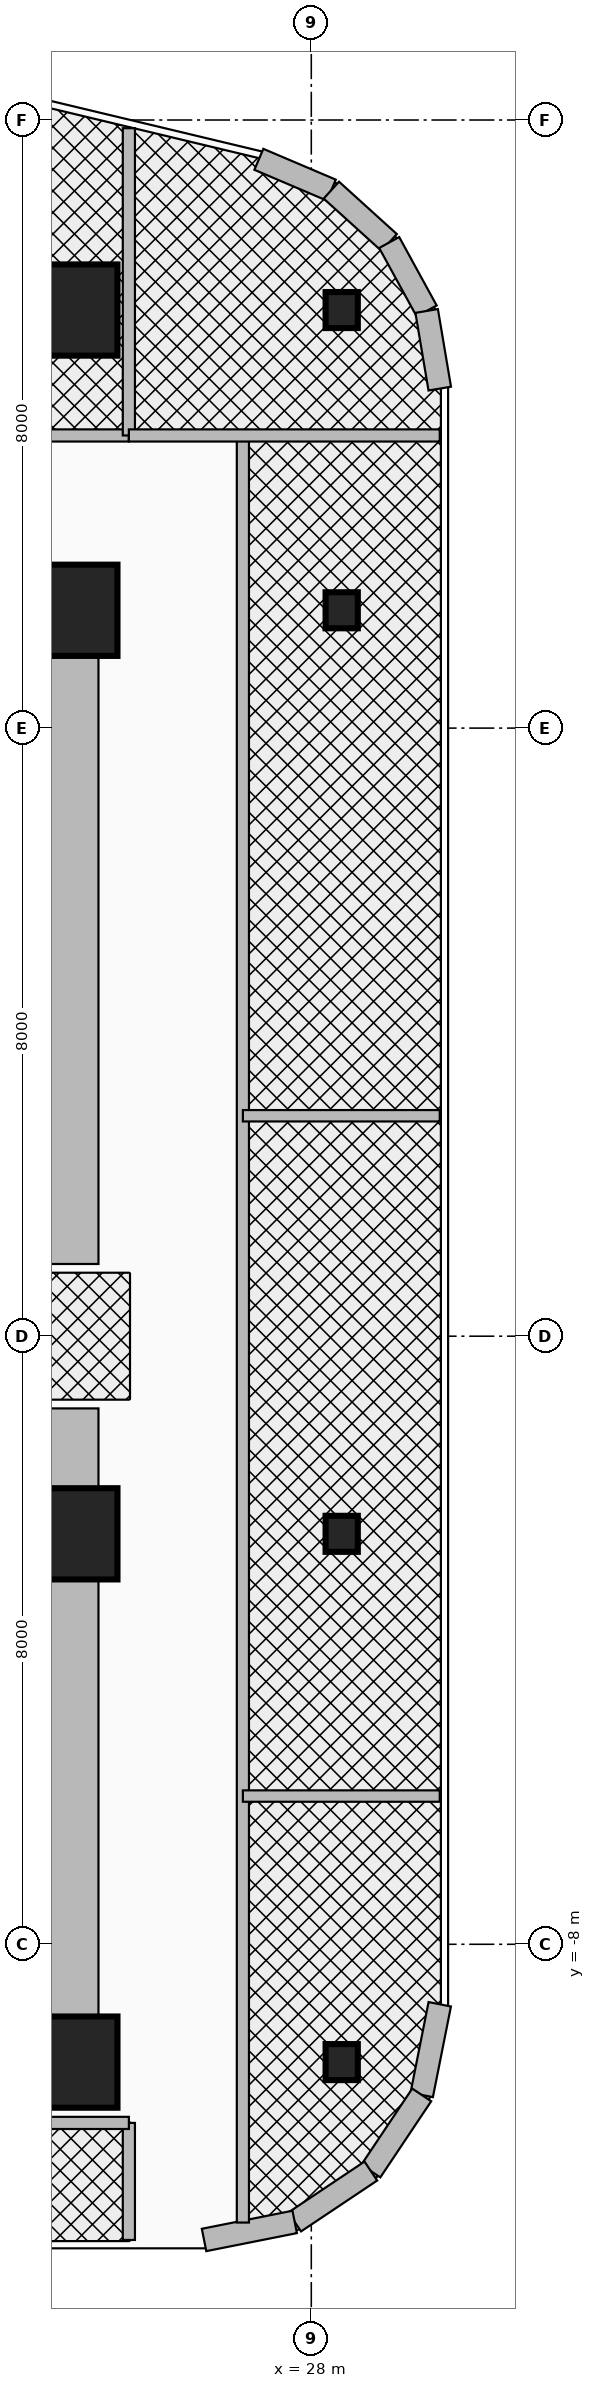
"""IFC4 building model, lengths in metres.
Left out: names, types, materials, properties, quantities, classifications, styles, units other than length and angle.
Written with IfcOpenShell. Run it as: python <this file> out.ifc"""

import sys

from ifc_helpers import new_model, si_unit, direction, frame, frame_2d, origin, origin_2d, place, context, subcontext, project, spatial, rectangle, i_section, extrude, source, transform, mapped, element, fill, save


model = new_model("IFC4")
c1 = context("Model", 3, precision=1e-05, world=origin(), true_north=direction((0.0, 1.0)))
c2 = subcontext(c1, "Body", "Model", "MODEL_VIEW")
j1 = project(units=[si_unit("LENGTHUNIT", "METRE"), si_unit("PLANEANGLEUNIT", "RADIAN")], contexts=[c1])
p1 = place(None, origin())
s1 = spatial("IfcSite", under=j1, at=p1, CompositionType="ELEMENT")
p2 = place(p1, origin())
s2 = spatial("IfcBuilding", under=s1, at=p2, CompositionType="ELEMENT")
p3 = place(p2, frame((0.0, 0.0, 109.4)))
s3 = spatial("IfcBuildingStorey", under=s2, at=p3, CompositionType="ELEMENT", Elevation=109.4)
for number, where, z_axis, x_axis in (
    (1, (24.85, -9.9, 0.0), (0.0, 0.0, 1.0), (0.0, 1.0, 0.0)),
    (2, (24.85, 0.95, 0.0), (0.0, 0.0, 1.0), (0.0, 1.0, 0.0)),
):
    element("IfcWall", number, at=place(p3, frame(where, z_axis=z_axis, x_axis=x_axis)), inside=s3, PredefinedType="SHEAR", context=c2, shape_type="SweptSolid", body=[
        extrude(rectangle(XDim=8.95, YDim=0.7, at=frame_2d((4.475, 0.0))), origin(), (0.0, 0.0, 1.0), 3.46),
    ])
for number, where, z_axis, x_axis in (
    (3, (15.85, 9.55, 0.0), (0.0, 0.0, 1.0), (1.0, 0.0, 0.0)),
    (4, (15.85, -9.55, 0.0), (0.0, 0.0, 1.0), (1.0, 0.0, 0.0)),
):
    element("IfcWall", number, at=place(p3, frame(where, z_axis=z_axis, x_axis=x_axis)), inside=s3, PredefinedType="SHEAR", context=c2, shape_type="SweptSolid", body=[
        extrude(rectangle(XDim=9.0, YDim=0.7, at=frame_2d((4.5, 0.0))), origin(), (0.0, 0.0, 1.0), 3.46),
    ])
m1 = source(origin(), c2, "Body", "SweptSolid", [
    extrude(rectangle(XDim=1.2, YDim=1.2, at=origin_2d()), origin(), (0.0, 0.0, 1.0), 3.7),
])
p4 = place(p3, frame((24.85, -9.55, 0.0), z_axis=(0.0, 0.0, 1.0), x_axis=(1.0, 0.0, 0.0)))
e5 = element("IfcColumn", 5, at=p4, inside=s3, PredefinedType="COLUMN", context=c2, shape_type="MappedRepresentation", body=[
    mapped(m1, transform((0.0, 0.0, 0.0), x_axis=(1.0, 0.0, 0.0), y_axis=(0.0, 1.0, 0.0), z_axis=(0.0, 0.0, 1.0), scale=1.0)),
])
m2 = source(origin(), c2, "Body", "SweptSolid", [
    extrude(i_section(OverallWidth=0.424, OverallDepth=0.474, WebThickness=0.048, FlangeThickness=0.077, at=origin_2d()), origin(), (0.0, 0.0, 1.0), 3.7),
])
p5 = place(p3, frame((28.4, -9.55, 0.0), z_axis=(0.0, 0.0, 1.0), x_axis=(1.0, 0.0, 0.0)))
e6 = element("IfcColumn", 6, at=p5, inside=s3, PredefinedType="COLUMN", context=c2, shape_type="MappedRepresentation", body=[
    mapped(m2, transform((0.0, 0.0, 0.0), x_axis=(1.0, 0.0, 0.0), y_axis=(0.0, 1.0, 0.0), z_axis=(0.0, 0.0, 1.0), scale=1.0)),
])
p6 = place(p3, frame((24.85, -2.6, 0.0), z_axis=(0.0, 0.0, 1.0), x_axis=(1.0, 0.0, 0.0)))
e7 = element("IfcColumn", 7, at=p6, inside=s3, PredefinedType="COLUMN", context=c2, shape_type="MappedRepresentation", body=[
    mapped(m1, transform((0.0, 0.0, 0.0), x_axis=(1.0, 0.0, 0.0), y_axis=(0.0, 1.0, 0.0), z_axis=(0.0, 0.0, 1.0), scale=1.0)),
])
p7 = place(p3, frame((28.4, -2.6, 0.0), z_axis=(0.0, 0.0, 1.0), x_axis=(1.0, 0.0, 0.0)))
e8 = element("IfcColumn", 8, at=p7, inside=s3, PredefinedType="COLUMN", context=c2, shape_type="MappedRepresentation", body=[
    mapped(m2, transform((0.0, 0.0, 0.0), x_axis=(1.0, 0.0, 0.0), y_axis=(0.0, 1.0, 0.0), z_axis=(0.0, 0.0, 1.0), scale=1.0)),
])
p8 = place(p3, frame((24.85, 9.55, 0.0), z_axis=(0.0, 0.0, 1.0), x_axis=(1.0, 0.0, 0.0)))
e9 = element("IfcColumn", 9, at=p8, inside=s3, PredefinedType="COLUMN", context=c2, shape_type="MappedRepresentation", body=[
    mapped(m1, transform((0.0, 0.0, 0.0), x_axis=(1.0, 0.0, 0.0), y_axis=(0.0, 1.0, 0.0), z_axis=(0.0, 0.0, 1.0), scale=1.0)),
])
p9 = place(p3, frame((28.4, 9.55, 0.0), z_axis=(0.0, 0.0, 1.0), x_axis=(1.0, 0.0, 0.0)))
e10 = element("IfcColumn", 10, at=p9, inside=s3, PredefinedType="COLUMN", context=c2, shape_type="MappedRepresentation", body=[
    mapped(m2, transform((0.0, 0.0, 0.0), x_axis=(1.0, 0.0, 0.0), y_axis=(0.0, 1.0, 0.0), z_axis=(0.0, 0.0, 1.0), scale=1.0)),
])
p10 = place(p3, frame((24.85, 13.5, 0.0), z_axis=(0.0, 0.0, 1.0), x_axis=(1.0, 0.0, 0.0)))
e11 = element("IfcColumn", 11, at=p10, inside=s3, PredefinedType="COLUMN", context=c2, shape_type="MappedRepresentation", body=[
    mapped(m1, transform((0.0, 0.0, 0.0), x_axis=(1.0, 0.0, 0.0), y_axis=(0.0, 1.0, 0.0), z_axis=(0.0, 0.0, 1.0), scale=1.0)),
])
p11 = place(p3, frame((28.4, 13.5, 0.0), z_axis=(0.0, 0.0, 1.0), x_axis=(1.0, 0.0, 0.0)))
e12 = element("IfcColumn", 12, at=p11, inside=s3, PredefinedType="COLUMN", context=c2, shape_type="MappedRepresentation", body=[
    mapped(m2, transform((0.0, 0.0, 0.0), x_axis=(1.0, 0.0, 0.0), y_axis=(0.0, 1.0, 0.0), z_axis=(0.0, 0.0, 1.0), scale=1.0)),
])
p12 = place(p3, frame((27.31, 15.483, 0.0), z_axis=(0.0, 0.0, 1.0), x_axis=(0.920250328759, -0.391330208927, 0.0)))
e13 = element("IfcWall", 13, at=p12, inside=s3, PredefinedType="SOLIDWALL", context=c2, shape_type="SweptSolid", body=[
    extrude(rectangle(XDim=1.036, YDim=0.3, at=frame_2d((0.518, 0.0))), origin(), (0.0, 0.0, 1.0), 3.46),
])
p13 = place(p3, frame((28.264, 15.077, 0.0), z_axis=(0.0, 0.0, 1.0), x_axis=(0.741208839713, -0.671274501178, 0.0)))
e14 = element("IfcWall", 14, at=p13, inside=s3, PredefinedType="SOLIDWALL", context=c2, shape_type="SweptSolid", body=[
    extrude(rectangle(XDim=1.026, YDim=0.3, at=frame_2d((0.513, 0.0))), origin(), (0.0, 0.0, 1.0), 3.46),
])
p14 = place(p3, frame((29.025, 14.388, 0.0), z_axis=(0.0, 0.0, 1.0), x_axis=(0.480284137298, -0.87711296163, 0.0)))
e15 = element("IfcWall", 15, at=p14, inside=s3, PredefinedType="SOLIDWALL", context=c2, shape_type="SweptSolid", body=[
    extrude(rectangle(XDim=1.027, YDim=0.3, at=frame_2d((0.513, 0.0))), origin(), (0.0, 0.0, 1.0), 3.46),
])
p15 = place(p3, frame((29.518, 13.488, 0.0), z_axis=(0.0, 0.0, 1.0), x_axis=(0.166156796952, -0.986099345313, 0.0)))
e16 = element("IfcWall", 16, at=p15, inside=s3, PredefinedType="SOLIDWALL", context=c2, shape_type="SweptSolid", body=[
    extrude(rectangle(XDim=1.036, YDim=0.3, at=frame_2d((0.518, 0.0))), origin(), (0.0, 0.0, 1.0), 3.46),
])
p16 = place(p3, frame((29.69, -8.789, 0.0), z_axis=(0.0, 0.0, 1.0), x_axis=(-0.194996050505, -0.980804027463, 0.0)))
e17 = element("IfcWall", 17, at=p16, inside=s3, PredefinedType="SOLIDWALL", context=c2, shape_type="SweptSolid", body=[
    extrude(rectangle(XDim=1.216, YDim=0.3, at=frame_2d((0.608, 0.0))), origin(), (0.0, 0.0, 1.0), 3.46),
])
for number, where, z_axis, x_axis in (
    (18, (29.453, -9.982, 0.0), (0.0, 0.0, 1.0), (-0.556, -0.831, 0.0)),
    (19, (28.783, -10.983, 0.0), (0.0, 0.0, 1.0), (-0.831, -0.556, 0.0)),
):
    element("IfcWall", number, at=place(p3, frame(where, z_axis=z_axis, x_axis=x_axis)), inside=s3, PredefinedType="SOLIDWALL", context=c2, shape_type="SweptSolid", body=[
        extrude(rectangle(XDim=1.205, YDim=0.3, at=frame_2d((0.603, 0.0))), origin(), (0.0, 0.0, 1.0), 3.46),
    ])
p17 = place(p3, frame((27.782, -11.653, 0.0), z_axis=(0.0, 0.0, 1.0), x_axis=(-0.980811661072, -0.194957650543, 0.0)))
e20 = element("IfcWall", 20, at=p17, inside=s3, PredefinedType="SOLIDWALL", context=c2, shape_type="SweptSolid", body=[
    extrude(rectangle(XDim=1.216, YDim=0.3, at=frame_2d((0.608, 0.0))), origin(), (0.0, 0.0, 1.0), 3.46),
])
p18 = place(p3, frame((15.4, 11.85, 0.0), z_axis=(0.0, 0.0, 1.0), x_axis=(1.0, 0.0, 0.0)))
e21 = element("IfcWall", 21, at=p18, inside=s3, PredefinedType="PARTITIONING", context=c2, shape_type="SweptSolid", body=[
    extrude(rectangle(XDim=10.2, YDim=0.16, at=frame_2d((5.1, 0.0))), origin(), (0.0, 0.0, 1.0), 2.834),
])
p19 = place(p18, frame((4.65, 0.0, 0.0)))
e22 = element("IfcOpeningElement", 22, at=p19, cuts=e21, PredefinedType="OPENING", context=c2, shape_type="SweptSolid", body=[
    extrude(rectangle(XDim=0.9, YDim=2.1, at=frame_2d((0.45, 1.05))), frame((0.0, 0.095, 0.0), z_axis=(0.0, -1.0, 0.0), x_axis=(1.0, 0.0, 0.0)), (0.0, 0.0, 1.0), 0.19),
])
p20 = place(p3, frame((25.6, 11.85, 0.0), z_axis=(0.0, 0.0, 1.0), x_axis=(0.0, 1.0, 0.0)))
e23 = element("IfcWall", 23, at=p20, inside=s3, PredefinedType="PARTITIONING", context=c2, shape_type="SweptSolid", body=[
    extrude(rectangle(XDim=4.042, YDim=0.16, at=frame_2d((2.021, 0.0))), origin(), (0.0, 0.0, 1.0), 2.666),
])
p21 = place(p3, frame((25.6, -11.89, 0.0), z_axis=(0.0, 0.0, 1.0), x_axis=(0.0, 1.0, 0.0)))
e24 = element("IfcWall", 24, at=p21, inside=s3, PredefinedType="PARTITIONING", context=c2, shape_type="SweptSolid", body=[
    extrude(rectangle(XDim=1.54, YDim=0.16, at=frame_2d((0.77, 0.0))), origin(), (0.0, 0.0, 1.0), 3.46),
])
p22 = place(p21, frame((0.32, 0.0, 0.0)))
e25 = element("IfcOpeningElement", 25, at=p22, cuts=e24, PredefinedType="OPENING", context=c2, shape_type="SweptSolid", body=[
    extrude(rectangle(XDim=0.9, YDim=2.1, at=frame_2d((0.45, 1.05))), frame((0.0, 0.095, 0.0), z_axis=(0.0, -1.0, 0.0), x_axis=(1.0, 0.0, 0.0)), (0.0, 0.0, 1.0), 0.19),
])
p23 = place(p3, frame((14.044, -10.35, 0.0), z_axis=(0.0, 0.0, 1.0), x_axis=(1.0, 0.0, 0.0)))
e26 = element("IfcWall", 26, at=p23, inside=s3, PredefinedType="PARTITIONING", context=c2, shape_type="SweptSolid", body=[
    extrude(rectangle(XDim=11.556, YDim=0.16, at=frame_2d((5.778, 0.0))), origin(), (0.0, 0.0, 1.0), 3.46),
])
p24 = place(p3, frame((27.1, -11.661, 0.0), z_axis=(0.0, 0.0, 1.0), x_axis=(0.0, 1.0, 0.0)))
e27 = element("IfcWall", 27, at=p24, inside=s3, PredefinedType="PARTITIONING", context=c2, shape_type="SweptSolid", body=[
    extrude(rectangle(XDim=23.511, YDim=0.16, at=frame_2d((11.755, 0.0))), origin(), (0.0, 0.0, 1.0), 2.666),
])
p25 = place(p24, frame((2.56, 0.0, 0.0)))
e28 = element("IfcOpeningElement", 28, at=p25, cuts=e27, PredefinedType="OPENING", context=c2, shape_type="SweptSolid", body=[
    extrude(rectangle(XDim=0.9, YDim=2.1, at=frame_2d((0.45, 1.05))), frame((0.0, 0.095, 0.0), z_axis=(0.0, -1.0, 0.0), x_axis=(1.0, 0.0, 0.0)), (0.0, 0.0, 1.0), 0.19),
])
p26 = place(p24, frame((9.451, 0.0, 0.0)))
e29 = element("IfcOpeningElement", 29, at=p26, cuts=e27, PredefinedType="OPENING", context=c2, shape_type="SweptSolid", body=[
    extrude(rectangle(XDim=1.8, YDim=2.15, at=frame_2d((0.9, 1.075))), frame((0.0, 0.095, 0.0), z_axis=(0.0, -1.0, 0.0), x_axis=(1.0, 0.0, 0.0)), (0.0, 0.0, 1.0), 0.19),
])
p27 = place(p24, frame((18.136, 0.0, 0.0)))
e30 = element("IfcOpeningElement", 30, at=p27, cuts=e27, PredefinedType="OPENING", context=c2, shape_type="SweptSolid", body=[
    extrude(rectangle(XDim=1.8, YDim=2.15, at=frame_2d((0.9, 1.075))), frame((0.0, 0.095, 0.0), z_axis=(0.0, -1.0, 0.0), x_axis=(1.0, 0.0, 0.0)), (0.0, 0.0, 1.0), 0.19),
])
p28 = place(p3, frame((25.6, 11.85, 0.0), z_axis=(0.0, 0.0, 1.0), x_axis=(1.0, 0.0, 0.0)))
e31 = element("IfcWall", 31, at=p28, inside=s3, PredefinedType="PARTITIONING", context=c2, shape_type="SweptSolid", body=[
    extrude(rectangle(XDim=4.09, YDim=0.16, at=frame_2d((2.045, 0.0))), origin(), (0.0, 0.0, 1.0), 2.896),
])
p29 = place(p28, frame((0.3, 0.0, 0.0)))
e32 = element("IfcOpeningElement", 32, at=p29, cuts=e31, PredefinedType="OPENING", context=c2, shape_type="SweptSolid", body=[
    extrude(rectangle(XDim=0.9, YDim=2.1, at=frame_2d((0.45, 1.05))), frame((0.0, 0.095, 0.0), z_axis=(0.0, -1.0, 0.0), x_axis=(1.0, 0.0, 0.0)), (0.0, 0.0, 1.0), 0.19),
])
for number, where, z_axis, x_axis in (
    (33, (27.1, -6.05, 0.0), (0.0, 0.0, 1.0), (1.0, 0.0, 0.0)),
    (34, (27.1, 2.9, 0.0), (0.0, 0.0, 1.0), (1.0, 0.0, 0.0)),
):
    element("IfcWall", number, at=place(p3, frame(where, z_axis=z_axis, x_axis=x_axis)), inside=s3, PredefinedType="PARTITIONING", context=c2, shape_type="SweptSolid", body=[
        extrude(rectangle(XDim=2.59, YDim=0.15, at=frame_2d((1.295, 0.0))), origin(), (0.0, 0.0, 1.0), 2.896),
    ])
p30 = place(p22, frame((0.9, 0.0, 0.0), z_axis=(0.0, 0.0, 1.0), x_axis=(-1.0, 0.0, 0.0)))
e35 = element("IfcDoor", 35, at=p30, inside=s3, OperationType="SINGLE_SWING_LEFT", PredefinedType="DOOR", context=c2, shape_type="SweptSolid", body=[
    extrude(rectangle(XDim=0.9, YDim=2.1, at=frame_2d((0.45, 1.05))), frame((0.0, 0.025, 0.0), z_axis=(0.0, -1.0, 0.0), x_axis=(1.0, 0.0, 0.0)), (0.0, 0.0, 1.0), 0.05),
])
fill(e25, e35)
p31 = place(p29, origin())
e36 = element("IfcDoor", 36, at=p31, inside=s3, OperationType="SINGLE_SWING_RIGHT", PredefinedType="DOOR", context=c2, shape_type="SweptSolid", body=[
    extrude(rectangle(XDim=0.9, YDim=2.1, at=frame_2d((0.45, 1.05))), frame((0.0, 0.025, 0.0), z_axis=(0.0, -1.0, 0.0), x_axis=(1.0, 0.0, 0.0)), (0.0, 0.0, 1.0), 0.05),
])
fill(e32, e36)
p32 = place(p25, frame((0.9, 0.0, 0.0), z_axis=(0.0, 0.0, 1.0), x_axis=(-1.0, 0.0, 0.0)))
e37 = element("IfcDoor", 37, at=p32, inside=s3, OperationType="SINGLE_SWING_LEFT", PredefinedType="DOOR", context=c2, shape_type="SweptSolid", body=[
    extrude(rectangle(XDim=0.9, YDim=2.1, at=frame_2d((0.45, 1.05))), frame((0.0, 0.025, 0.0), z_axis=(0.0, -1.0, 0.0), x_axis=(1.0, 0.0, 0.0)), (0.0, 0.0, 1.0), 0.05),
])
fill(e28, e37)
p33 = place(p26, origin())
e38 = element("IfcDoor", 38, at=p33, inside=s3, OperationType="DOUBLE_DOOR_SINGLE_SWING", PredefinedType="DOOR", context=c2, shape_type="SweptSolid", body=[
    extrude(rectangle(XDim=1.8, YDim=2.15, at=frame_2d((0.9, 1.075))), frame((0.0, 0.025, 0.0), z_axis=(0.0, -1.0, 0.0), x_axis=(1.0, 0.0, 0.0)), (0.0, 0.0, 1.0), 0.05),
])
fill(e29, e38)
p34 = place(p27, frame((1.8, 0.0, 0.0), z_axis=(0.0, 0.0, 1.0), x_axis=(-1.0, 0.0, 0.0)))
e39 = element("IfcDoor", 39, at=p34, inside=s3, OperationType="DOUBLE_DOOR_SINGLE_SWING", PredefinedType="DOOR", context=c2, shape_type="SweptSolid", body=[
    extrude(rectangle(XDim=1.8, YDim=2.15, at=frame_2d((0.9, 1.075))), frame((0.0, 0.025, 0.0), z_axis=(0.0, -1.0, 0.0), x_axis=(1.0, 0.0, 0.0)), (0.0, 0.0, 1.0), 0.05),
])
fill(e30, e39)
save(model, sys.argv[1])
